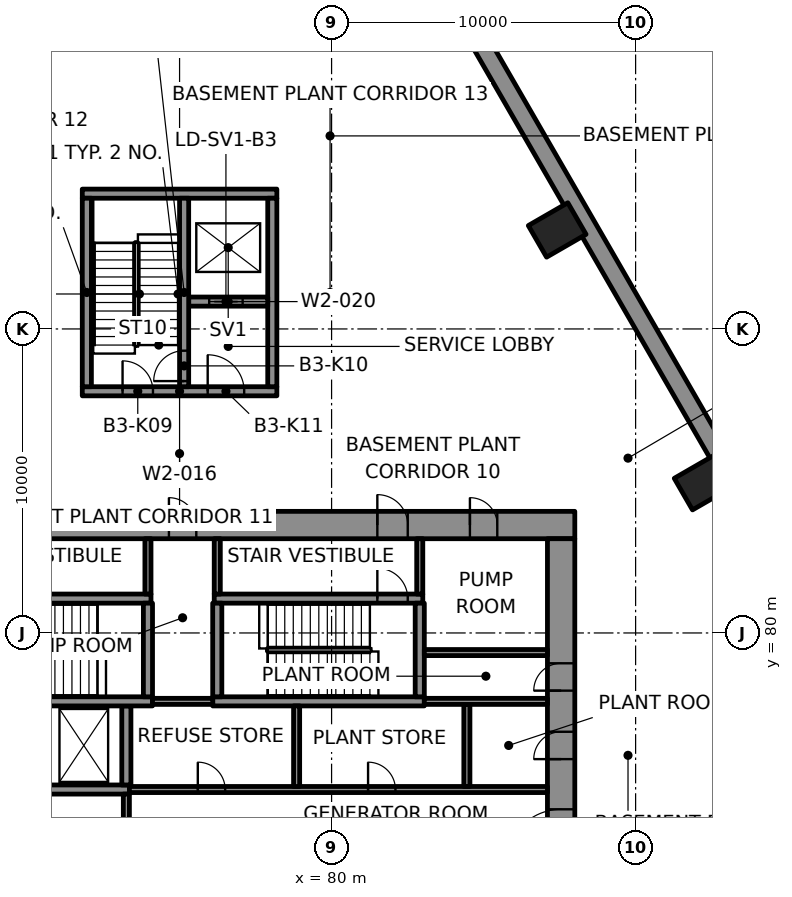
"""IFC4 building model, lengths in metres.
Left out: names, types, materials, properties, quantities, classifications, styles, units other than length and angle.
Written with IfcOpenShell. Run it as: python <this file> out.ifc"""

import sys

from ifc_helpers import new_model, si_unit, direction, frame, frame_2d, origin, origin_2d, place, context, subcontext, project, spatial, polyline, rectangle, outline, extrude, element, fill, save


model = new_model("IFC4")
c1 = context("Model", 3, precision=1e-05, world=origin(), true_north=direction((0.0, 1.0)))
c2 = subcontext(c1, "Body", "Model", "MODEL_VIEW")
j1 = project(units=[si_unit("LENGTHUNIT", "METRE"), si_unit("PLANEANGLEUNIT", "RADIAN")], contexts=[c1])
p1 = place(None, origin())
s1 = spatial("IfcSite", under=j1, at=p1, CompositionType="ELEMENT")
p2 = place(p1, origin())
s2 = spatial("IfcBuilding", under=s1, at=p2, CompositionType="ELEMENT")
p3 = place(p2, frame((0.0, 0.0, -14.0)))
s3 = spatial("IfcBuildingStorey", under=s2, at=p3, CompositionType="ELEMENT", Elevation=-14.0)
p4 = place(p3, frame((109.132, 57.451, -0.35), z_axis=(0.0, 0.0, 1.0), x_axis=(-0.499999206999, 0.866025861623, 0.0)))
e1 = element("IfcWall", 1, at=p4, inside=s3, PredefinedType="SOLIDWALL", context=c2, shape_type="SweptSolid", body=[
    extrude(rectangle(XDim=61.064, YDim=0.6, at=frame_2d((30.532, 0.0))), origin(), (0.0, 0.0, 1.0), 4.5),
])
p5 = place(p3, frame((0.0, 0.0, -14.5)))
e2 = element("IfcWall", 2, at=p5, inside=s3, PredefinedType="SOLIDWALL", context=c2, shape_type="SweptSolid", body=[
    extrude(outline(polyline([(109.132, 57.451), (78.6, 110.334), (79.062, 111.134), (110.056, 57.451), (109.132, 57.451)])), origin(), (0.0, 0.0, 1.0), 14.15),
])
for number, where, z_axis, x_axis in (
    (3, (92.22, 84.942, -0.35), (0.0, 0.0, 1.0), (-0.5, 0.866, 0.0)),
    (4, (87.421, 93.256, -0.35), (0.0, 0.0, 1.0), (-0.5, 0.866, 0.0)),
):
    element("IfcColumn", number, at=place(p3, frame(where, z_axis=z_axis, x_axis=x_axis)), inside=s3, PredefinedType="COLUMN", context=c2, shape_type="SweptSolid", body=[
        extrude(rectangle(XDim=1.2, YDim=1.5, at=origin_2d()), origin(), (0.0, 0.0, 1.0), 4.85),
    ])
p6 = place(p3, frame((62.0, 83.55, -0.35), z_axis=(0.0, 0.0, 1.0), x_axis=(1.0, 0.0, 0.0)))
e5 = element("IfcWall", 5, at=p6, inside=s3, PredefinedType="SHEAR", context=c2, shape_type="SweptSolid", body=[
    extrude(rectangle(XDim=26.0, YDim=0.9, at=frame_2d((13.0, 0.0))), origin(), (0.0, 0.0, 1.0), 4.5),
])
p7 = place(p6, frame((5.695, 0.0, 0.35)))
e6 = element("IfcOpeningElement", 6, at=p7, cuts=e5, PredefinedType="OPENING", context=c2, shape_type="SweptSolid", body=[
    extrude(rectangle(XDim=1.0, YDim=2.1, at=frame_2d((0.5, 1.05))), frame((0.0, 0.46, 0.0), z_axis=(0.0, -1.0, 0.0), x_axis=(1.0, 0.0, 0.0)), (0.0, 0.0, 1.0), 0.92),
])
p8 = place(p6, frame((19.505, 0.0, 0.35)))
e7 = element("IfcOpeningElement", 7, at=p8, cuts=e5, PredefinedType="OPENING", context=c2, shape_type="SweptSolid", body=[
    extrude(rectangle(XDim=1.0, YDim=2.1, at=frame_2d((0.5, 1.05))), frame((0.0, 0.46, 0.0), z_axis=(0.0, -1.0, 0.0), x_axis=(1.0, 0.0, 0.0)), (0.0, 0.0, 1.0), 0.92),
])
p9 = place(p6, frame((3.45, 0.0, 0.35)))
e8 = element("IfcOpeningElement", 8, at=p9, cuts=e5, PredefinedType="OPENING", context=c2, shape_type="SweptSolid", body=[
    extrude(rectangle(XDim=0.9, YDim=2.1, at=frame_2d((0.45, 1.05))), frame((0.0, 0.46, 0.0), z_axis=(0.0, -1.0, 0.0), x_axis=(1.0, 0.0, 0.0)), (0.0, 0.0, 1.0), 0.92),
])
p10 = place(p6, frame((12.65, 0.0, 0.35)))
e9 = element("IfcOpeningElement", 9, at=p10, cuts=e5, PredefinedType="OPENING", context=c2, shape_type="SweptSolid", body=[
    extrude(rectangle(XDim=0.9, YDim=2.1, at=frame_2d((0.45, 1.05))), frame((0.0, 0.46, 0.0), z_axis=(0.0, -1.0, 0.0), x_axis=(1.0, 0.0, 0.0)), (0.0, 0.0, 1.0), 0.92),
])
p11 = place(p6, frame((22.55, 0.0, 0.35)))
e10 = element("IfcOpeningElement", 10, at=p11, cuts=e5, PredefinedType="OPENING", context=c2, shape_type="SweptSolid", body=[
    extrude(rectangle(XDim=0.9, YDim=2.1, at=frame_2d((0.45, 1.05))), frame((0.0, 0.46, 0.0), z_axis=(0.0, -1.0, 0.0), x_axis=(1.0, 0.0, 0.0)), (0.0, 0.0, 1.0), 0.92),
])
p12 = place(p3, frame((87.55, 66.9, -0.35), z_axis=(0.0, 0.0, 1.0), x_axis=(0.0, 1.0, 0.0)))
e11 = element("IfcWall", 11, at=p12, inside=s3, PredefinedType="SHEAR", context=c2, shape_type="SweptSolid", body=[
    extrude(rectangle(XDim=16.2, YDim=0.9, at=frame_2d((8.1, 0.0))), origin(), (0.0, 0.0, 1.0), 4.5),
])
p13 = place(p12, frame((5.5, 0.0, 0.35)))
e12 = element("IfcOpeningElement", 12, at=p13, cuts=e11, PredefinedType="OPENING", context=c2, shape_type="SweptSolid", body=[
    extrude(rectangle(XDim=1.8, YDim=2.1, at=frame_2d((0.9, 1.05))), frame((0.0, 0.46, 0.0), z_axis=(0.0, -1.0, 0.0), x_axis=(1.0, 0.0, 0.0)), (0.0, 0.0, 1.0), 0.92),
])
p14 = place(p12, frame((2.95, 0.0, 0.35)))
e13 = element("IfcOpeningElement", 13, at=p14, cuts=e11, PredefinedType="OPENING", context=c2, shape_type="SweptSolid", body=[
    extrude(rectangle(XDim=0.9, YDim=2.1, at=frame_2d((0.45, 1.05))), frame((0.0, 0.46, 0.0), z_axis=(0.0, -1.0, 0.0), x_axis=(1.0, 0.0, 0.0)), (0.0, 0.0, 1.0), 0.92),
])
p15 = place(p12, frame((8.95, 0.0, 0.35)))
e14 = element("IfcOpeningElement", 14, at=p15, cuts=e11, PredefinedType="OPENING", context=c2, shape_type="SweptSolid", body=[
    extrude(rectangle(XDim=0.9, YDim=2.1, at=frame_2d((0.45, 1.05))), frame((0.0, 0.46, 0.0), z_axis=(0.0, -1.0, 0.0), x_axis=(1.0, 0.0, 0.0)), (0.0, 0.0, 1.0), 0.92),
])
p16 = place(p12, frame((11.202, 0.0, 0.35)))
e15 = element("IfcOpeningElement", 15, at=p16, cuts=e11, PredefinedType="OPENING", context=c2, shape_type="SweptSolid", body=[
    extrude(rectangle(XDim=0.9, YDim=2.1, at=frame_2d((0.45, 1.05))), frame((0.0, 0.46, 0.0), z_axis=(0.0, -1.0, 0.0), x_axis=(1.0, 0.0, 0.0)), (0.0, 0.0, 1.0), 0.92),
])
p17 = place(p3, frame((70.3, 74.85, -0.35), z_axis=(0.0, 0.0, 1.0), x_axis=(1.0, 0.0, 0.0)))
e16 = element("IfcWall", 16, at=p17, inside=s3, PredefinedType="SHEAR", context=c2, shape_type="SweptSolid", body=[
    extrude(rectangle(XDim=3.05, YDim=0.3, at=frame_2d((1.525, 0.0))), origin(), (0.0, 0.0, 1.0), 4.5),
])
p18 = place(p3, frame((73.25, 75.0, -0.35), z_axis=(0.0, 0.0, 1.0), x_axis=(0.0, 1.0, 0.0)))
e17 = element("IfcWall", 17, at=p18, inside=s3, PredefinedType="SHEAR", context=c2, shape_type="SweptSolid", body=[
    extrude(rectangle(XDim=2.6, YDim=0.3, at=frame_2d((1.3, 0.0))), origin(), (0.0, 0.0, 1.0), 4.5),
])
p19 = place(p3, frame((67.15, 77.75, -0.35), z_axis=(0.0, 0.0, 1.0), x_axis=(1.0, 0.0, 0.0)))
e18 = element("IfcWall", 18, at=p19, inside=s3, PredefinedType="SHEAR", context=c2, shape_type="SweptSolid", body=[
    extrude(rectangle(XDim=6.96, YDim=0.3, at=frame_2d((3.48, 0.0))), origin(), (0.0, 0.0, 1.0), 4.5),
])
p20 = place(p19, frame((0.545, 0.0, 0.35)))
e19 = element("IfcOpeningElement", 19, at=p20, cuts=e18, PredefinedType="OPENING", context=c2, shape_type="SweptSolid", body=[
    extrude(rectangle(XDim=1.0, YDim=2.1, at=frame_2d((0.5, 1.05))), frame((0.0, 0.16, 0.0), z_axis=(0.0, -1.0, 0.0), x_axis=(1.0, 0.0, 0.0)), (0.0, 0.0, 1.0), 0.32),
])
p21 = place(p3, frame((76.09, 77.75, -0.35), z_axis=(0.0, 0.0, 1.0), x_axis=(1.0, 0.0, 0.0)))
e20 = element("IfcWall", 20, at=p21, inside=s3, PredefinedType="SHEAR", context=c2, shape_type="SweptSolid", body=[
    extrude(rectangle(XDim=6.96, YDim=0.3, at=frame_2d((3.48, 0.0))), origin(), (0.0, 0.0, 1.0), 4.5),
])
p22 = place(p3, frame((67.15, 81.13, -0.35), z_axis=(0.0, 0.0, 1.0), x_axis=(1.0, 0.0, 0.0)))
e21 = element("IfcWall", 21, at=p22, inside=s3, PredefinedType="SHEAR", context=c2, shape_type="SweptSolid", body=[
    extrude(rectangle(XDim=6.91, YDim=0.3, at=frame_2d((3.455, 0.0))), origin(), (0.0, 0.0, 1.0), 4.5),
])
p23 = place(p22, frame((0.545, 0.0, 0.35)))
e22 = element("IfcOpeningElement", 22, at=p23, cuts=e21, PredefinedType="OPENING", context=c2, shape_type="SweptSolid", body=[
    extrude(rectangle(XDim=1.0, YDim=2.1, at=frame_2d((0.5, 1.05))), frame((0.0, 0.16, 0.0), z_axis=(0.0, -1.0, 0.0), x_axis=(1.0, 0.0, 0.0)), (0.0, 0.0, 1.0), 0.32),
])
p24 = place(p3, frame((76.14, 81.13, -0.35), z_axis=(0.0, 0.0, 1.0), x_axis=(1.0, 0.0, 0.0)))
e23 = element("IfcWall", 23, at=p24, inside=s3, PredefinedType="SHEAR", context=c2, shape_type="SweptSolid", body=[
    extrude(rectangle(XDim=6.86, YDim=0.3, at=frame_2d((3.43, 0.0))), origin(), (0.0, 0.0, 1.0), 4.5),
])
p25 = place(p24, frame((5.365, 0.0, 0.35)))
e24 = element("IfcOpeningElement", 24, at=p25, cuts=e23, PredefinedType="OPENING", context=c2, shape_type="SweptSolid", body=[
    extrude(rectangle(XDim=1.0, YDim=2.1, at=frame_2d((0.5, 1.05))), frame((0.0, 0.16, 0.0), z_axis=(0.0, -1.0, 0.0), x_axis=(1.0, 0.0, 0.0)), (0.0, 0.0, 1.0), 0.32),
])
for number, where, z_axis, x_axis in (
    (25, (73.96, 77.9, -0.35), (0.0, 0.0, 1.0), (0.0, 1.0, 0.0)),
    (26, (76.24, 77.9, -0.35), (0.0, 0.0, 1.0), (0.0, 1.0, 0.0)),
    (27, (82.9, 77.9, -0.35), (0.0, 0.0, 1.0), (0.0, 1.0, 0.0)),
):
    element("IfcWall", number, at=place(p3, frame(where, z_axis=z_axis, x_axis=x_axis)), inside=s3, PredefinedType="SHEAR", context=c2, shape_type="SweptSolid", body=[
        extrude(rectangle(XDim=3.08, YDim=0.3, at=frame_2d((1.54, 0.0))), origin(), (0.0, 0.0, 1.0), 4.5),
    ])
p26 = place(p3, frame((71.8, 87.95, -0.35), z_axis=(0.0, 0.0, 1.0), x_axis=(1.0, 0.0, 0.0)))
e28 = element("IfcWall", 28, at=p26, inside=s3, PredefinedType="SHEAR", context=c2, shape_type="SweptSolid", body=[
    extrude(rectangle(XDim=6.4, YDim=0.3, at=frame_2d((3.2, 0.0))), origin(), (0.0, 0.0, 1.0), 4.5),
])
p27 = place(p26, frame((1.325, 0.0, 0.35)))
e29 = element("IfcOpeningElement", 29, at=p27, cuts=e28, PredefinedType="OPENING", context=c2, shape_type="SweptSolid", body=[
    extrude(rectangle(XDim=1.0, YDim=2.1, at=frame_2d((0.5, 1.05))), frame((0.0, 0.16, 0.0), z_axis=(0.0, -1.0, 0.0), x_axis=(1.0, 0.0, 0.0)), (0.0, 0.0, 1.0), 0.32),
])
p28 = place(p26, frame((4.125, 0.0, 0.35)))
e30 = element("IfcOpeningElement", 30, at=p28, cuts=e28, PredefinedType="OPENING", context=c2, shape_type="SweptSolid", body=[
    extrude(rectangle(XDim=1.2, YDim=2.1, at=frame_2d((0.6, 1.05))), frame((0.0, 0.16, 0.0), z_axis=(0.0, -1.0, 0.0), x_axis=(1.0, 0.0, 0.0)), (0.0, 0.0, 1.0), 0.32),
])
p29 = place(p3, frame((71.8, 94.45, -0.35), z_axis=(0.0, 0.0, 1.0), x_axis=(1.0, 0.0, 0.0)))
e31 = element("IfcWall", 31, at=p29, inside=s3, PredefinedType="SHEAR", context=c2, shape_type="SweptSolid", body=[
    extrude(rectangle(XDim=6.4, YDim=0.3, at=frame_2d((3.2, 0.0))), origin(), (0.0, 0.0, 1.0), 4.5),
])
for number, where, z_axis, x_axis in (
    (32, (71.95, 88.1, -0.35), (0.0, 0.0, 1.0), (0.0, 1.0, 0.0)),
    (33, (78.05, 88.1, -0.35), (0.0, 0.0, 1.0), (0.0, 1.0, 0.0)),
):
    element("IfcWall", number, at=place(p3, frame(where, z_axis=z_axis, x_axis=x_axis)), inside=s3, PredefinedType="SHEAR", context=c2, shape_type="SweptSolid", body=[
        extrude(rectangle(XDim=6.2, YDim=0.3, at=frame_2d((3.1, 0.0))), origin(), (0.0, 0.0, 1.0), 4.5),
    ])
p30 = place(p3, frame((75.3, 90.9, -0.35), z_axis=(0.0, 0.0, 1.0), x_axis=(1.0, 0.0, 0.0)))
e34 = element("IfcWall", 34, at=p30, inside=s3, PredefinedType="SHEAR", context=c2, shape_type="SweptSolid", body=[
    extrude(rectangle(XDim=2.6, YDim=0.3, at=frame_2d((1.3, 0.0))), origin(), (0.0, 0.0, 1.0), 4.5),
])
p31 = place(p30, frame((0.675, 0.0, 0.35)))
e35 = element("IfcOpeningElement", 35, at=p31, cuts=e34, PredefinedType="OPENING", context=c2, shape_type="SweptSolid", body=[
    extrude(rectangle(XDim=1.1, YDim=2.1, at=frame_2d((0.55, 1.05))), frame((0.0, 0.16, 0.0), z_axis=(0.0, -1.0, 0.0), x_axis=(1.0, 0.0, 0.0)), (0.0, 0.0, 1.0), 0.32),
])
p32 = place(p3, frame((75.15, 88.1, -0.35), z_axis=(0.0, 0.0, 1.0), x_axis=(0.0, 1.0, 0.0)))
e36 = element("IfcWall", 36, at=p32, inside=s3, PredefinedType="SHEAR", context=c2, shape_type="SweptSolid", body=[
    extrude(rectangle(XDim=6.2, YDim=0.3, at=frame_2d((3.1, 0.0))), origin(), (0.0, 0.0, 1.0), 4.5),
])
p33 = place(p32, frame((0.185, 0.0, 0.35)))
e37 = element("IfcOpeningElement", 37, at=p33, cuts=e36, PredefinedType="OPENING", context=c2, shape_type="SweptSolid", body=[
    extrude(rectangle(XDim=1.0, YDim=2.1, at=frame_2d((0.5, 1.05))), frame((0.0, 0.16, 0.0), z_axis=(0.0, -1.0, 0.0), x_axis=(1.0, 0.0, 0.0)), (0.0, 0.0, 1.0), 0.32),
])
p34 = place(p3, frame((73.35, 74.85, 0.0), z_axis=(0.0, 0.0, 1.0), x_axis=(1.0, 0.0, 0.0)))
e38 = element("IfcWall", 38, at=p34, inside=s3, PredefinedType="PARTITIONING", context=c2, shape_type="SweptSolid", body=[
    extrude(rectangle(XDim=13.75, YDim=0.2, at=frame_2d((6.875, 0.0))), origin(), (0.0, 0.0, 1.0), 4.15),
])
p35 = place(p34, frame((2.25, 0.0, 0.0)))
e39 = element("IfcOpeningElement", 39, at=p35, cuts=e38, PredefinedType="OPENING", context=c2, shape_type="SweptSolid", body=[
    extrude(rectangle(XDim=0.9, YDim=2.1, at=frame_2d((0.45, 1.05))), frame((0.0, 0.11, 0.0), z_axis=(0.0, -1.0, 0.0), x_axis=(1.0, 0.0, 0.0)), (0.0, 0.0, 1.0), 0.22),
])
p36 = place(p34, frame((7.85, 0.0, 0.0)))
e40 = element("IfcOpeningElement", 40, at=p36, cuts=e38, PredefinedType="OPENING", context=c2, shape_type="SweptSolid", body=[
    extrude(rectangle(XDim=0.9, YDim=2.1, at=frame_2d((0.45, 1.05))), frame((0.0, 0.11, 0.0), z_axis=(0.0, -1.0, 0.0), x_axis=(1.0, 0.0, 0.0)), (0.0, 0.0, 1.0), 0.22),
])
p37 = place(p3, frame((74.11, 77.75, 0.0), z_axis=(0.0, 0.0, 1.0), x_axis=(1.0, 0.0, 0.0)))
e41 = element("IfcWall", 41, at=p37, inside=s3, PredefinedType="PARTITIONING", context=c2, shape_type="SweptSolid", body=[
    extrude(rectangle(XDim=1.98, YDim=0.2, at=frame_2d((0.99, 0.0))), origin(), (0.0, 0.0, 1.0), 4.15),
])
for number, where, z_axis, x_axis in (
    (42, (83.05, 77.75, 0.0), (0.0, 0.0, 1.0), (1.0, 0.0, 0.0)),
    (43, (83.05, 79.355, 0.0), (0.0, 0.0, 1.0), (1.0, 0.0, 0.0)),
):
    element("IfcWall", number, at=place(p3, frame(where, z_axis=z_axis, x_axis=x_axis)), inside=s3, PredefinedType="PARTITIONING", context=c2, shape_type="SweptSolid", body=[
        extrude(rectangle(XDim=4.05, YDim=0.2, at=frame_2d((2.025, 0.0))), origin(), (0.0, 0.0, 1.0), 4.15),
    ])
p38 = place(p3, frame((73.25, 71.9, 0.0), z_axis=(0.0, 0.0, 1.0), x_axis=(0.0, 1.0, 0.0)))
e44 = element("IfcWall", 44, at=p38, inside=s3, PredefinedType="PARTITIONING", context=c2, shape_type="SweptSolid", body=[
    extrude(rectangle(XDim=2.8, YDim=0.2, at=frame_2d((1.4, 0.0))), origin(), (0.0, 0.0, 1.0), 4.15),
])
p39 = place(p38, frame((0.8, 0.0, 0.0)))
e45 = element("IfcOpeningElement", 45, at=p39, cuts=e44, PredefinedType="OPENING", context=c2, shape_type="SweptSolid", body=[
    extrude(rectangle(XDim=1.2, YDim=2.1, at=frame_2d((0.6, 1.05))), frame((0.0, 0.11, 0.0), z_axis=(0.0, -1.0, 0.0), x_axis=(1.0, 0.0, 0.0)), (0.0, 0.0, 1.0), 0.22),
])
for number, where, z_axis, x_axis in (
    (46, (73.96, 81.28, 0.0), (0.0, 0.0, 1.0), (0.0, 1.0, 0.0)),
    (47, (76.24, 81.28, 0.0), (0.0, 0.0, 1.0), (0.0, 1.0, 0.0)),
):
    element("IfcWall", number, at=place(p3, frame(where, z_axis=z_axis, x_axis=x_axis)), inside=s3, PredefinedType="PARTITIONING", context=c2, shape_type="SweptSolid", body=[
        extrude(rectangle(XDim=1.82, YDim=0.2, at=frame_2d((0.91, 0.0))), origin(), (0.0, 0.0, 1.0), 4.15),
    ])
p40 = place(p3, frame((78.85, 74.95, 0.0), z_axis=(0.0, 0.0, 1.0), x_axis=(0.0, 1.0, 0.0)))
e48 = element("IfcWall", 48, at=p40, inside=s3, PredefinedType="PARTITIONING", context=c2, shape_type="SweptSolid", body=[
    extrude(rectangle(XDim=2.65, YDim=0.2, at=frame_2d((1.325, 0.0))), origin(), (0.0, 0.0, 1.0), 4.15),
])
p41 = place(p3, frame((82.9, 81.28, 0.0), z_axis=(0.0, 0.0, 1.0), x_axis=(0.0, 1.0, 0.0)))
e49 = element("IfcWall", 49, at=p41, inside=s3, PredefinedType="PARTITIONING", context=c2, shape_type="SweptSolid", body=[
    extrude(rectangle(XDim=1.82, YDim=0.2, at=frame_2d((0.91, 0.0))), origin(), (0.0, 0.0, 1.0), 4.15),
])
p42 = place(p3, frame((84.45, 74.95, 0.0), z_axis=(0.0, 0.0, 1.0), x_axis=(0.0, 1.0, 0.0)))
e50 = element("IfcWall", 50, at=p42, inside=s3, PredefinedType="PARTITIONING", context=c2, shape_type="SweptSolid", body=[
    extrude(rectangle(XDim=2.7, YDim=0.2, at=frame_2d((1.35, 0.0))), origin(), (0.0, 0.0, 1.0), 4.15),
])
p43 = place(p31, origin())
e51 = element("IfcDoor", 51, at=p43, inside=s3, OperationType="DOUBLE_DOOR_SLIDING", PredefinedType="DOOR", context=c2, shape_type="SweptSolid", body=[
    extrude(rectangle(XDim=1.1, YDim=2.1, at=frame_2d((0.55, 1.05))), frame((0.0, 0.025, 0.0), z_axis=(0.0, -1.0, 0.0), x_axis=(1.0, 0.0, 0.0)), (0.0, 0.0, 1.0), 0.05),
])
fill(e35, e51)
p44 = place(p25, origin())
e52 = element("IfcDoor", 52, at=p44, inside=s3, OperationType="SINGLE_SWING_RIGHT", PredefinedType="DOOR", context=c2, shape_type="SweptSolid", body=[
    extrude(rectangle(XDim=1.0, YDim=2.1, at=frame_2d((0.5, 1.05))), frame((0.0, 0.025, 0.0), z_axis=(0.0, -1.0, 0.0), x_axis=(1.0, 0.0, 0.0)), (0.0, 0.0, 1.0), 0.05),
])
fill(e24, e52)
p45 = place(p8, origin())
e53 = element("IfcDoor", 53, at=p45, inside=s3, OperationType="SINGLE_SWING_LEFT", PredefinedType="DOOR", context=c2, shape_type="SweptSolid", body=[
    extrude(rectangle(XDim=1.0, YDim=2.1, at=frame_2d((0.5, 1.05))), frame((0.0, 0.17, 0.0), z_axis=(0.0, -1.0, 0.0), x_axis=(1.0, 0.0, 0.0)), (0.0, 0.0, 1.0), 0.34),
])
fill(e7, e53)
p46 = place(p27, origin())
e54 = element("IfcDoor", 54, at=p46, inside=s3, OperationType="SINGLE_SWING_RIGHT", PredefinedType="DOOR", context=c2, shape_type="SweptSolid", body=[
    extrude(rectangle(XDim=1.0, YDim=2.1, at=frame_2d((0.5, 1.05))), frame((0.0, 0.025, 0.0), z_axis=(0.0, -1.0, 0.0), x_axis=(1.0, 0.0, 0.0)), (0.0, 0.0, 1.0), 0.05),
])
fill(e29, e54)
p47 = place(p33, origin())
e55 = element("IfcDoor", 55, at=p47, inside=s3, OperationType="SINGLE_SWING_LEFT", PredefinedType="DOOR", context=c2, shape_type="SweptSolid", body=[
    extrude(rectangle(XDim=1.0, YDim=2.1, at=frame_2d((0.5, 1.05))), frame((0.0, 0.025, 0.0), z_axis=(0.0, -1.0, 0.0), x_axis=(1.0, 0.0, 0.0)), (0.0, 0.0, 1.0), 0.05),
])
fill(e37, e55)
p48 = place(p28, origin())
e56 = element("IfcDoor", 56, at=p48, inside=s3, OperationType="SINGLE_SWING_RIGHT", PredefinedType="DOOR", context=c2, shape_type="SweptSolid", body=[
    extrude(rectangle(XDim=1.2, YDim=2.1, at=frame_2d((0.6, 1.05))), frame((0.0, 0.025, 0.0), z_axis=(0.0, -1.0, 0.0), x_axis=(1.0, 0.0, 0.0)), (0.0, 0.0, 1.0), 0.05),
])
fill(e30, e56)
p49 = place(p13, origin())
e57 = element("IfcDoor", 57, at=p49, inside=s3, OperationType="SINGLE_SWING_RIGHT", PredefinedType="DOOR", context=c2, shape_type="SweptSolid", body=[
    extrude(rectangle(XDim=1.8, YDim=2.1, at=frame_2d((0.9, 1.05))), frame((0.0, 0.17, 0.0), z_axis=(0.0, -1.0, 0.0), x_axis=(1.0, 0.0, 0.0)), (0.0, 0.0, 1.0), 0.34),
])
fill(e12, e57)
p50 = place(p35, origin())
e58 = element("IfcDoor", 58, at=p50, inside=s3, OperationType="SINGLE_SWING_RIGHT", PredefinedType="DOOR", context=c2, shape_type="SweptSolid", body=[
    extrude(rectangle(XDim=0.9, YDim=2.1, at=frame_2d((0.45, 1.05))), frame((0.0, 0.025, 0.0), z_axis=(0.0, -1.0, 0.0), x_axis=(1.0, 0.0, 0.0)), (0.0, 0.0, 1.0), 0.05),
])
fill(e39, e58)
p51 = place(p36, origin())
e59 = element("IfcDoor", 59, at=p51, inside=s3, OperationType="SINGLE_SWING_LEFT", PredefinedType="DOOR", context=c2, shape_type="SweptSolid", body=[
    extrude(rectangle(XDim=0.9, YDim=2.1, at=frame_2d((0.45, 1.05))), frame((0.0, 0.025, 0.0), z_axis=(0.0, -1.0, 0.0), x_axis=(1.0, 0.0, 0.0)), (0.0, 0.0, 1.0), 0.05),
])
fill(e40, e59)
p52 = place(p15, origin())
e60 = element("IfcDoor", 60, at=p52, inside=s3, OperationType="SINGLE_SWING_RIGHT", PredefinedType="DOOR", context=c2, shape_type="SweptSolid", body=[
    extrude(rectangle(XDim=0.9, YDim=2.1, at=frame_2d((0.45, 1.05))), frame((0.0, 0.17, 0.0), z_axis=(0.0, -1.0, 0.0), x_axis=(1.0, 0.0, 0.0)), (0.0, 0.0, 1.0), 0.34),
])
fill(e14, e60)
p53 = place(p10, origin())
e61 = element("IfcDoor", 61, at=p53, inside=s3, OperationType="SINGLE_SWING_LEFT", PredefinedType="DOOR", context=c2, shape_type="SweptSolid", body=[
    extrude(rectangle(XDim=0.9, YDim=2.1, at=frame_2d((0.45, 1.05))), frame((0.0, 0.17, 0.0), z_axis=(0.0, -1.0, 0.0), x_axis=(1.0, 0.0, 0.0)), (0.0, 0.0, 1.0), 0.34),
])
fill(e9, e61)
p54 = place(p16, origin())
e62 = element("IfcDoor", 62, at=p54, inside=s3, OperationType="SINGLE_SWING_RIGHT", PredefinedType="DOOR", context=c2, shape_type="SweptSolid", body=[
    extrude(rectangle(XDim=0.9, YDim=2.1, at=frame_2d((0.45, 1.05))), frame((0.0, 0.17, 0.0), z_axis=(0.0, -1.0, 0.0), x_axis=(1.0, 0.0, 0.0)), (0.0, 0.0, 1.0), 0.34),
])
fill(e15, e62)
p55 = place(p11, origin())
e63 = element("IfcDoor", 63, at=p55, inside=s3, OperationType="SINGLE_SWING_LEFT", PredefinedType="DOOR", context=c2, shape_type="SweptSolid", body=[
    extrude(rectangle(XDim=0.9, YDim=2.1, at=frame_2d((0.45, 1.05))), frame((0.0, 0.17, 0.0), z_axis=(0.0, -1.0, 0.0), x_axis=(1.0, 0.0, 0.0)), (0.0, 0.0, 1.0), 0.34),
])
fill(e10, e63)
save(model, sys.argv[1])
